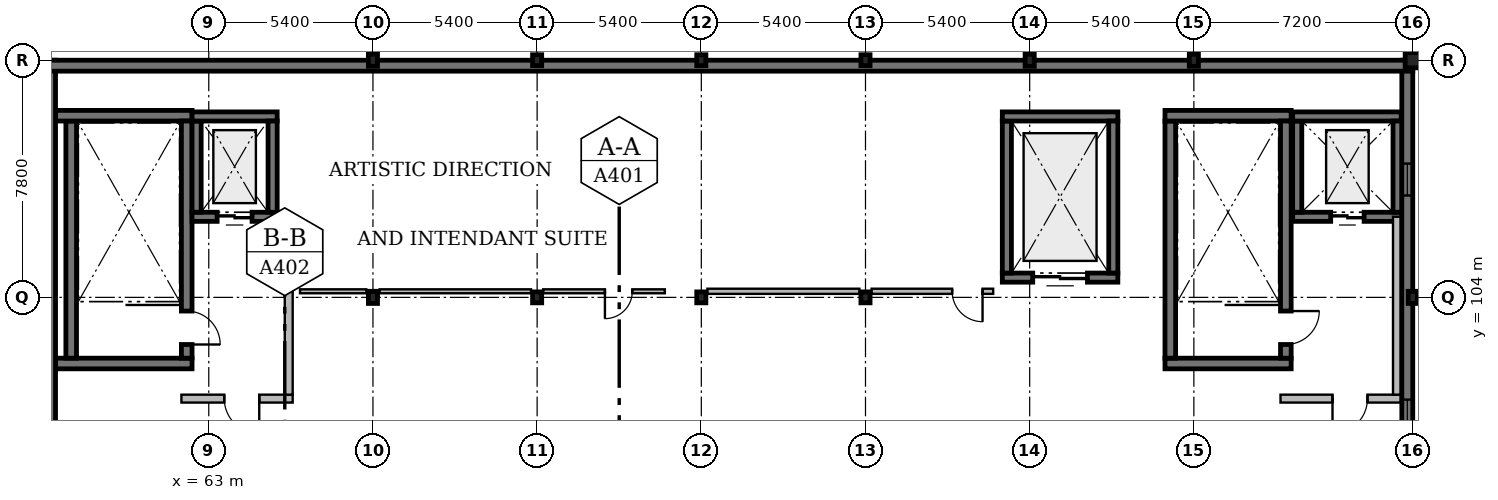
"""IFC4 building model, lengths in metres.
Left out: names, types, materials, properties, quantities, classifications, styles, units other than length and angle.
Written with IfcOpenShell. Run it as: python <this file> out.ifc"""

import sys

from ifc_helpers import new_model, si_unit, direction, frame, frame_2d, origin, origin_2d, place, context, subcontext, project, spatial, rectangle, i_section, extrude, element, fill, save


model = new_model("IFC4")
c1 = context("Model", 3, precision=1e-05, world=origin(), true_north=direction((0.0, 1.0)))
c2 = subcontext(c1, "Body", "Model", "MODEL_VIEW")
j1 = project(units=[si_unit("LENGTHUNIT", "METRE"), si_unit("PLANEANGLEUNIT", "RADIAN")], contexts=[c1])
p1 = place(None, origin())
s1 = spatial("IfcSite", under=j1, at=p1, CompositionType="ELEMENT")
p2 = place(p1, origin())
s2 = spatial("IfcBuilding", under=s1, at=p2, CompositionType="ELEMENT")
p3 = place(p2, frame((0.0, 0.0, 21.0)))
s3 = spatial("IfcBuildingStorey", under=s2, at=p3, CompositionType="ELEMENT", Elevation=21.0)
for number, where, z_axis, x_axis in (
    (1, (68.4, 104.0, 0.0), (0.0, 0.0, 1.0), (1.0, 0.0, 0.0)),
    (2, (68.4, 111.8, 0.0), (0.0, 0.0, 1.0), (1.0, 0.0, 0.0)),
):
    element("IfcColumn", number, at=place(p3, frame(where, z_axis=z_axis, x_axis=x_axis)), inside=s3, PredefinedType="COLUMN", context=c2, shape_type="SweptSolid", body=[
        extrude(i_section(OverallWidth=0.3, OverallDepth=0.4, WebThickness=0.013, FlangeThickness=0.024, FilletRadius=0.027, at=origin_2d()), origin(), (0.0, 0.0, 1.0), 3.9),
    ])
for number, where, z_axis, x_axis in (
    (3, (73.8, 104.0, 0.0), (0.0, 0.0, 1.0), (1.0, 0.0, 0.0)),
    (4, (73.8, 111.8, 0.0), (0.0, 0.0, 1.0), (1.0, 0.0, 0.0)),
    (5, (79.2, 104.0, 0.0), (0.0, 0.0, 1.0), (1.0, 0.0, 0.0)),
    (6, (79.2, 111.8, 0.0), (0.0, 0.0, 1.0), (1.0, 0.0, 0.0)),
    (7, (84.6, 104.0, 0.0), (0.0, 0.0, 1.0), (1.0, 0.0, 0.0)),
    (8, (84.6, 111.8, 0.0), (0.0, 0.0, 1.0), (1.0, 0.0, 0.0)),
):
    element("IfcColumn", number, at=place(p3, frame(where, z_axis=z_axis, x_axis=x_axis)), inside=s3, PredefinedType="COLUMN", context=c2, shape_type="SweptSolid", body=[
        extrude(i_section(OverallWidth=0.3, OverallDepth=0.36, WebThickness=0.012, FlangeThickness=0.022, FilletRadius=0.027, at=origin_2d()), origin(), (0.0, 0.0, 1.0), 3.9),
    ])
for number, where, z_axis, x_axis in (
    (9, (90.0, 111.8, 0.0), (0.0, 0.0, 1.0), (1.0, 0.0, 0.0)),
    (10, (95.4, 111.8, 0.0), (0.0, 0.0, 1.0), (1.0, 0.0, 0.0)),
    (11, (102.6, 104.0, 0.0), (0.0, 0.0, 1.0), (1.0, 0.0, 0.0)),
):
    element("IfcColumn", number, at=place(p3, frame(where, z_axis=z_axis, x_axis=x_axis)), inside=s3, PredefinedType="COLUMN", context=c2, shape_type="SweptSolid", body=[
        extrude(i_section(OverallWidth=0.3, OverallDepth=0.4, WebThickness=0.013, FlangeThickness=0.024, FilletRadius=0.027, at=origin_2d()), origin(), (0.0, 0.0, 1.0), 3.9),
    ])
p4 = place(p3, frame((102.6, 111.8, 0.0), z_axis=(0.0, 0.0, 1.0), x_axis=(1.0, 0.0, 0.0)))
e12 = element("IfcColumn", 12, at=p4, inside=s3, PredefinedType="COLUMN", context=c2, shape_type="SweptSolid", body=[
    extrude(rectangle(XDim=0.5, YDim=0.5, at=origin_2d()), origin(), (0.0, 0.0, 1.0), 3.9),
])
p5 = place(p3, frame((98.6, 101.825, 0.0), z_axis=(0.0, 0.0, 1.0), x_axis=(-1.0, 0.0, 0.0)))
e13 = element("IfcWall", 13, at=p5, inside=s3, PredefinedType="SOLIDWALL", context=c2, shape_type="SweptSolid", body=[
    extrude(rectangle(XDim=4.15, YDim=0.35, at=frame_2d((2.075, 0.0))), origin(), (0.0, 0.0, 1.0), 3.75),
])
p6 = place(p3, frame((94.625, 102.0, 0.0), z_axis=(0.0, 0.0, 1.0), x_axis=(0.0, 1.0, 0.0)))
e14 = element("IfcWall", 14, at=p6, inside=s3, PredefinedType="SOLIDWALL", context=c2, shape_type="SweptSolid", body=[
    extrude(rectangle(XDim=7.8, YDim=0.35, at=frame_2d((3.9, 0.0))), origin(), (0.0, 0.0, 1.0), 3.75),
])
p7 = place(p3, frame((94.45, 109.975, 0.0), z_axis=(0.0, 0.0, 1.0), x_axis=(1.0, 0.0, 0.0)))
e15 = element("IfcWall", 15, at=p7, inside=s3, PredefinedType="SOLIDWALL", context=c2, shape_type="SweptSolid", body=[
    extrude(rectangle(XDim=4.15, YDim=0.35, at=frame_2d((2.075, 0.0))), origin(), (0.0, 0.0, 1.0), 3.75),
])
p8 = place(p3, frame((98.425, 109.8, 0.0), z_axis=(0.0, 0.0, 1.0), x_axis=(0.0, -1.0, 0.0)))
e16 = element("IfcWall", 16, at=p8, inside=s3, PredefinedType="SOLIDWALL", context=c2, shape_type="SweptSolid", body=[
    extrude(rectangle(XDim=7.8, YDim=0.35, at=frame_2d((3.9, 0.0))), origin(), (0.0, 0.0, 1.0), 3.75),
])
p9 = place(p8, frame((6.25, 0.0, 0.0)))
e17 = element("IfcOpeningElement", 17, at=p9, cuts=e16, PredefinedType="OPENING", context=c2, shape_type="SweptSolid", body=[
    extrude(rectangle(XDim=1.1, YDim=2.15, at=frame_2d((0.55, 1.075))), frame((0.0, 0.195, 0.0), z_axis=(0.0, -1.0, 0.0), x_axis=(1.0, 0.0, 0.0)), (0.0, 0.0, 1.0), 0.39),
])
p10 = place(p3, frame((102.25, 106.65, 0.0), z_axis=(0.0, 0.0, 1.0), x_axis=(-1.0, 0.0, 0.0)))
e18 = element("IfcWall", 18, at=p10, inside=s3, PredefinedType="SOLIDWALL", context=c2, shape_type="SweptSolid", body=[
    extrude(rectangle(XDim=3.6, YDim=0.3, at=frame_2d((1.8, 0.0))), origin(), (0.0, 0.0, 1.0), 3.75),
])
p11 = place(p10, frame((1.25, 0.0, 0.0)))
e19 = element("IfcOpeningElement", 19, at=p11, cuts=e18, PredefinedType="OPENING", context=c2, shape_type="SweptSolid", body=[
    extrude(rectangle(XDim=1.1, YDim=2.1, at=frame_2d((0.55, 1.05))), frame((0.0, 0.17, 0.0), z_axis=(0.0, -1.0, 0.0), x_axis=(1.0, 0.0, 0.0)), (0.0, 0.0, 1.0), 0.34),
])
p12 = place(p3, frame((98.8, 106.8, 0.0), z_axis=(0.0, 0.0, 1.0), x_axis=(0.0, 1.0, 0.0)))
e20 = element("IfcWall", 20, at=p12, inside=s3, PredefinedType="SOLIDWALL", context=c2, shape_type="SweptSolid", body=[
    extrude(rectangle(XDim=3.0, YDim=0.3, at=frame_2d((1.5, 0.0))), origin(), (0.0, 0.0, 1.0), 3.75),
])
p13 = place(p3, frame((98.65, 109.95, 0.0), z_axis=(0.0, 0.0, 1.0), x_axis=(1.0, 0.0, 0.0)))
e21 = element("IfcWall", 21, at=p13, inside=s3, PredefinedType="SOLIDWALL", context=c2, shape_type="SweptSolid", body=[
    extrude(rectangle(XDim=3.57, YDim=0.3, at=frame_2d((1.785, 0.0))), origin(), (0.0, 0.0, 1.0), 3.75),
])
p14 = place(p3, frame((102.1, 109.8, 0.0), z_axis=(0.0, 0.0, 1.0), x_axis=(0.0, -1.0, 0.0)))
e22 = element("IfcWall", 22, at=p14, inside=s3, PredefinedType="SOLIDWALL", context=c2, shape_type="SweptSolid", body=[
    extrude(rectangle(XDim=3.0, YDim=0.3, at=frame_2d((1.5, 0.0))), origin(), (0.0, 0.0, 1.0), 3.75),
])
p15 = place(p3, frame((102.21, 100.67, 0.0), z_axis=(0.0, 0.0, 1.0), x_axis=(-1.0, 0.0, 0.0)))
e23 = element("IfcWall", 23, at=p15, inside=s3, PredefinedType="SOLIDWALL", context=c2, shape_type="SweptSolid", body=[
    extrude(rectangle(XDim=3.96, YDim=0.26, at=frame_2d((1.98, 0.0))), origin(), (0.0, 0.0, 1.0), 3.66),
])
p16 = place(p15, frame((1.1, 0.0, 0.0)))
e24 = element("IfcOpeningElement", 24, at=p16, cuts=e23, PredefinedType="OPENING", context=c2, shape_type="SweptSolid", body=[
    extrude(rectangle(XDim=1.15, YDim=2.2, at=frame_2d((0.575, 1.1))), frame((0.0, 0.15, 0.0), z_axis=(0.0, -1.0, 0.0), x_axis=(1.0, 0.0, 0.0)), (0.0, 0.0, 1.0), 0.3),
])
p17 = place(p3, frame((102.08, 106.65, 0.0), z_axis=(0.0, 0.0, 1.0), x_axis=(0.0, -1.0, 0.0)))
e25 = element("IfcWall", 25, at=p17, inside=s3, PredefinedType="SOLIDWALL", context=c2, shape_type="SweptSolid", body=[
    extrude(rectangle(XDim=5.85, YDim=0.26, at=frame_2d((2.925, 0.0))), origin(), (0.0, 0.0, 1.0), 3.66),
])
p18 = place(p3, frame((62.45, 101.825, 0.0), z_axis=(0.0, 0.0, 1.0), x_axis=(-1.0, 0.0, 0.0)))
e26 = element("IfcWall", 26, at=p18, inside=s3, PredefinedType="SOLIDWALL", context=c2, shape_type="SweptSolid", body=[
    extrude(rectangle(XDim=4.49, YDim=0.35, at=frame_2d((2.245, 0.0))), origin(), (0.0, 0.0, 1.0), 3.75),
])
p19 = place(p3, frame((58.475, 102.0, 0.0), z_axis=(0.0, 0.0, 1.0), x_axis=(0.0, 1.0, 0.0)))
e27 = element("IfcWall", 27, at=p19, inside=s3, PredefinedType="SOLIDWALL", context=c2, shape_type="SweptSolid", body=[
    extrude(rectangle(XDim=7.8, YDim=0.35, at=frame_2d((3.9, 0.0))), origin(), (0.0, 0.0, 1.0), 3.75),
])
p20 = place(p3, frame((57.96, 109.975, 0.0), z_axis=(0.0, 0.0, 1.0), x_axis=(1.0, 0.0, 0.0)))
e28 = element("IfcWall", 28, at=p20, inside=s3, PredefinedType="SOLIDWALL", context=c2, shape_type="SweptSolid", body=[
    extrude(rectangle(XDim=4.49, YDim=0.35, at=frame_2d((2.245, 0.0))), origin(), (0.0, 0.0, 1.0), 3.75),
])
p21 = place(p3, frame((62.275, 109.8, 0.0), z_axis=(0.0, 0.0, 1.0), x_axis=(0.0, -1.0, 0.0)))
e29 = element("IfcWall", 29, at=p21, inside=s3, PredefinedType="SOLIDWALL", context=c2, shape_type="SweptSolid", body=[
    extrude(rectangle(XDim=7.8, YDim=0.35, at=frame_2d((3.9, 0.0))), origin(), (0.0, 0.0, 1.0), 3.75),
])
p22 = place(p21, frame((6.25, 0.0, 0.0)))
e30 = element("IfcOpeningElement", 30, at=p22, cuts=e29, PredefinedType="OPENING", context=c2, shape_type="SweptSolid", body=[
    extrude(rectangle(XDim=1.1, YDim=2.15, at=frame_2d((0.55, 1.075))), frame((0.0, 0.195, 0.0), z_axis=(0.0, -1.0, 0.0), x_axis=(1.0, 0.0, 0.0)), (0.0, 0.0, 1.0), 0.39),
])
p23 = place(p3, frame((65.25, 106.65, 0.0), z_axis=(0.0, 0.0, 1.0), x_axis=(-1.0, 0.0, 0.0)))
e31 = element("IfcWall", 31, at=p23, inside=s3, PredefinedType="SOLIDWALL", context=c2, shape_type="SweptSolid", body=[
    extrude(rectangle(XDim=2.8, YDim=0.3, at=frame_2d((1.4, 0.0))), origin(), (0.0, 0.0, 1.0), 3.75),
])
p24 = place(p23, frame((0.825, 0.0, 0.0)))
e32 = element("IfcOpeningElement", 32, at=p24, cuts=e31, PredefinedType="OPENING", context=c2, shape_type="SweptSolid", body=[
    extrude(rectangle(XDim=1.15, YDim=2.1, at=frame_2d((0.575, 1.05))), frame((0.0, 0.17, 0.0), z_axis=(0.0, -1.0, 0.0), x_axis=(1.0, 0.0, 0.0)), (0.0, 0.0, 1.0), 0.34),
])
p25 = place(p3, frame((62.6, 106.8, 0.0), z_axis=(0.0, 0.0, 1.0), x_axis=(0.0, 1.0, 0.0)))
e33 = element("IfcWall", 33, at=p25, inside=s3, PredefinedType="SOLIDWALL", context=c2, shape_type="SweptSolid", body=[
    extrude(rectangle(XDim=3.0, YDim=0.3, at=frame_2d((1.5, 0.0))), origin(), (0.0, 0.0, 1.0), 3.75),
])
p26 = place(p3, frame((62.45, 109.95, 0.0), z_axis=(0.0, 0.0, 1.0), x_axis=(1.0, 0.0, 0.0)))
e34 = element("IfcWall", 34, at=p26, inside=s3, PredefinedType="SOLIDWALL", context=c2, shape_type="SweptSolid", body=[
    extrude(rectangle(XDim=2.8, YDim=0.3, at=frame_2d((1.4, 0.0))), origin(), (0.0, 0.0, 1.0), 3.75),
])
p27 = place(p3, frame((65.1, 109.8, 0.0), z_axis=(0.0, 0.0, 1.0), x_axis=(0.0, -1.0, 0.0)))
e35 = element("IfcWall", 35, at=p27, inside=s3, PredefinedType="SOLIDWALL", context=c2, shape_type="SweptSolid", body=[
    extrude(rectangle(XDim=3.0, YDim=0.3, at=frame_2d((1.5, 0.0))), origin(), (0.0, 0.0, 1.0), 3.75),
])
p28 = place(p3, frame((65.76, 100.67, 0.0), z_axis=(0.0, 0.0, 1.0), x_axis=(-1.0, 0.0, 0.0)))
e36 = element("IfcWall", 36, at=p28, inside=s3, PredefinedType="SOLIDWALL", context=c2, shape_type="SweptSolid", body=[
    extrude(rectangle(XDim=3.66, YDim=0.26, at=frame_2d((1.83, 0.0))), origin(), (0.0, 0.0, 1.0), 3.66),
])
p29 = place(p28, frame((1.1, 0.0, 0.0)))
e37 = element("IfcOpeningElement", 37, at=p29, cuts=e36, PredefinedType="OPENING", context=c2, shape_type="SweptSolid", body=[
    extrude(rectangle(XDim=1.15, YDim=2.2, at=frame_2d((0.575, 1.1))), frame((0.0, 0.15, 0.0), z_axis=(0.0, -1.0, 0.0), x_axis=(1.0, 0.0, 0.0)), (0.0, 0.0, 1.0), 0.3),
])
p30 = place(p3, frame((65.63, 106.65, 0.0), z_axis=(0.0, 0.0, 1.0), x_axis=(0.0, -1.0, 0.0)))
e38 = element("IfcWall", 38, at=p30, inside=s3, PredefinedType="SOLIDWALL", context=c2, shape_type="SweptSolid", body=[
    extrude(rectangle(XDim=5.85, YDim=0.26, at=frame_2d((2.925, 0.0))), origin(), (0.0, 0.0, 1.0), 3.66),
])
p31 = place(p3, frame((92.9, 104.65, 0.0), z_axis=(0.0, 0.0, 1.0), x_axis=(-1.0, 0.0, 0.0)))
e39 = element("IfcWall", 39, at=p31, inside=s3, PredefinedType="SOLIDWALL", context=c2, shape_type="SweptSolid", body=[
    extrude(rectangle(XDim=3.8, YDim=0.3, at=frame_2d((1.9, 0.0))), origin(), (0.0, 0.0, 1.0), 3.75),
])
p32 = place(p31, frame((1.0, 0.0, 0.0)))
e40 = element("IfcOpeningElement", 40, at=p32, cuts=e39, PredefinedType="OPENING", context=c2, shape_type="SweptSolid", body=[
    extrude(rectangle(XDim=1.8, YDim=2.4, at=frame_2d((0.9, 1.2))), frame((0.0, 0.17, 0.0), z_axis=(0.0, -1.0, 0.0), x_axis=(1.0, 0.0, 0.0)), (0.0, 0.0, 1.0), 0.34),
])
p33 = place(p3, frame((89.25, 104.8, 0.0), z_axis=(0.0, 0.0, 1.0), x_axis=(0.0, 1.0, 0.0)))
e41 = element("IfcWall", 41, at=p33, inside=s3, PredefinedType="SOLIDWALL", context=c2, shape_type="SweptSolid", body=[
    extrude(rectangle(XDim=5.0, YDim=0.3, at=frame_2d((2.5, 0.0))), origin(), (0.0, 0.0, 1.0), 3.75),
])
p34 = place(p3, frame((89.1, 109.95, 0.0), z_axis=(0.0, 0.0, 1.0), x_axis=(1.0, 0.0, 0.0)))
e42 = element("IfcWall", 42, at=p34, inside=s3, PredefinedType="SOLIDWALL", context=c2, shape_type="SweptSolid", body=[
    extrude(rectangle(XDim=3.8, YDim=0.3, at=frame_2d((1.9, 0.0))), origin(), (0.0, 0.0, 1.0), 3.75),
])
p35 = place(p3, frame((92.75, 109.8, 0.0), z_axis=(0.0, 0.0, 1.0), x_axis=(0.0, -1.0, 0.0)))
e43 = element("IfcWall", 43, at=p35, inside=s3, PredefinedType="SOLIDWALL", context=c2, shape_type="SweptSolid", body=[
    extrude(rectangle(XDim=5.0, YDim=0.3, at=frame_2d((2.5, 0.0))), origin(), (0.0, 0.0, 1.0), 3.75),
])
p36 = place(p3, frame((57.78, 87.8, 0.0), z_axis=(0.0, 0.0, 1.0), x_axis=(0.0, 1.0, 0.0)))
e44 = element("IfcWall", 44, at=p36, inside=s3, PredefinedType="SOLIDWALL", context=c2, shape_type="SweptSolid", body=[
    extrude(rectangle(XDim=24.0, YDim=0.36, at=frame_2d((12.0, 0.0))), origin(), (0.0, 0.0, 1.0), 3.65),
])
p37 = place(p3, frame((102.42, 87.8, 0.0), z_axis=(0.0, 0.0, 1.0), x_axis=(0.0, 1.0, 0.0)))
e45 = element("IfcWall", 45, at=p37, inside=s3, PredefinedType="SOLIDWALL", context=c2, shape_type="SweptSolid", body=[
    extrude(rectangle(XDim=24.0, YDim=0.36, at=frame_2d((12.0, 0.0))), origin(), (0.0, 0.0, 1.0), 3.65),
])
p38 = place(p37, frame((3.63, 0.0, 0.95)))
e46 = element("IfcOpeningElement", 46, at=p38, cuts=e45, PredefinedType="OPENING", context=c2, shape_type="SweptSolid", body=[
    extrude(rectangle(XDim=1.14, YDim=1.85, at=frame_2d((0.57, 0.925))), frame((0.0, 0.2, 0.0), z_axis=(0.0, -1.0, 0.0), x_axis=(1.0, 0.0, 0.0)), (0.0, 0.0, 1.0), 0.4),
])
p39 = place(p37, frame((11.788, 0.0, 0.95)))
e47 = element("IfcOpeningElement", 47, at=p39, cuts=e45, PredefinedType="OPENING", context=c2, shape_type="SweptSolid", body=[
    extrude(rectangle(XDim=1.05, YDim=1.85, at=frame_2d((0.525, 0.925))), frame((0.0, 0.2, 0.0), z_axis=(0.0, -1.0, 0.0), x_axis=(1.0, 0.0, 0.0)), (0.0, 0.0, 1.0), 0.4),
])
p40 = place(p37, frame((19.55, 0.0, 0.95)))
e48 = element("IfcOpeningElement", 48, at=p40, cuts=e45, PredefinedType="OPENING", context=c2, shape_type="SweptSolid", body=[
    extrude(rectangle(XDim=1.05, YDim=1.6, at=frame_2d((0.525, 0.8))), frame((0.0, 0.2, 0.0), z_axis=(0.0, -1.0, 0.0), x_axis=(1.0, 0.0, 0.0)), (0.0, 0.0, 1.0), 0.4),
])
p41 = place(p3, frame((57.6, 111.62, 0.0), z_axis=(0.0, 0.0, 1.0), x_axis=(1.0, 0.0, 0.0)))
e49 = element("IfcWall", 49, at=p41, inside=s3, PredefinedType="SOLIDWALL", context=c2, shape_type="SweptSolid", body=[
    extrude(rectangle(XDim=45.0, YDim=0.36, at=frame_2d((22.5, 0.0))), origin(), (0.0, 0.0, 1.0), 3.65),
])
p42 = place(p3, frame((78.0, 104.2, 0.0), z_axis=(0.0, 0.0, 1.0), x_axis=(-1.0, 0.0, 0.0)))
e50 = element("IfcWall", 50, at=p42, inside=s3, PredefinedType="PARTITIONING", context=c2, shape_type="SweptSolid", body=[
    extrude(rectangle(XDim=4.0, YDim=0.13, at=frame_2d((2.0, 0.0))), origin(), (0.0, 0.0, 1.0), 3.18),
])
p43 = place(p42, frame((1.07, 0.0, 0.0)))
e51 = element("IfcOpeningElement", 51, at=p43, cuts=e50, PredefinedType="OPENING", context=c2, shape_type="SweptSolid", body=[
    extrude(rectangle(XDim=0.9, YDim=2.15, at=frame_2d((0.45, 1.075))), frame((0.0, 0.085, 0.0), z_axis=(0.0, -1.0, 0.0), x_axis=(1.0, 0.0, 0.0)), (0.0, 0.0, 1.0), 0.17),
])
p44 = place(p3, frame((73.6, 104.2, 0.0), z_axis=(0.0, 0.0, 1.0), x_axis=(-1.0, 0.0, 0.0)))
e52 = element("IfcWall", 52, at=p44, inside=s3, PredefinedType="PARTITIONING", context=c2, shape_type="SweptSolid", body=[
    extrude(rectangle(XDim=4.98, YDim=0.13, at=frame_2d((2.49, 0.0))), origin(), (0.0, 0.0, 1.0), 3.18),
])
p45 = place(p3, frame((68.18, 104.2, 0.0), z_axis=(0.0, 0.0, 1.0), x_axis=(-1.0, 0.0, 0.0)))
e53 = element("IfcWall", 53, at=p45, inside=s3, PredefinedType="PARTITIONING", context=c2, shape_type="SweptSolid", body=[
    extrude(rectangle(XDim=2.18, YDim=0.13, at=frame_2d((1.09, 0.0))), origin(), (0.0, 0.0, 1.0), 3.66),
])
p46 = place(p3, frame((88.8, 104.2, 0.0), z_axis=(0.0, 0.0, 1.0), x_axis=(-1.0, 0.0, 0.0)))
e54 = element("IfcWall", 54, at=p46, inside=s3, PredefinedType="PARTITIONING", context=c2, shape_type="SweptSolid", body=[
    extrude(rectangle(XDim=4.0, YDim=0.17, at=frame_2d((2.0, 0.0))), origin(), (0.0, 0.0, 1.0), 3.66),
])
p47 = place(p46, frame((0.35, 0.0, 0.0)))
e55 = element("IfcOpeningElement", 55, at=p47, cuts=e54, PredefinedType="OPENING", context=c2, shape_type="SweptSolid", body=[
    extrude(rectangle(XDim=1.0, YDim=2.2, at=frame_2d((0.5, 1.1))), frame((0.0, 0.105, 0.0), z_axis=(0.0, -1.0, 0.0), x_axis=(1.0, 0.0, 0.0)), (0.0, 0.0, 1.0), 0.21),
])
p48 = place(p3, frame((84.4, 104.2, 0.0), z_axis=(0.0, 0.0, 1.0), x_axis=(-1.0, 0.0, 0.0)))
e56 = element("IfcWall", 56, at=p48, inside=s3, PredefinedType="PARTITIONING", context=c2, shape_type="SweptSolid", body=[
    extrude(rectangle(XDim=5.0, YDim=0.17, at=frame_2d((2.5, 0.0))), origin(), (0.0, 0.0, 1.0), 3.18),
])
p49 = place(p9, origin())
e57 = element("IfcDoor", 57, at=p49, inside=s3, OperationType="SINGLE_SWING_LEFT", PredefinedType="DOOR", context=c2, shape_type="SweptSolid", body=[
    extrude(rectangle(XDim=1.1, YDim=2.15, at=frame_2d((0.55, 1.075))), frame((0.0, 0.025, 0.0), z_axis=(0.0, -1.0, 0.0), x_axis=(1.0, 0.0, 0.0)), (0.0, 0.0, 1.0), 0.05),
])
fill(e17, e57)
p50 = place(p11, origin())
e58 = element("IfcDoor", 58, at=p50, inside=s3, OperationType="DOUBLE_DOOR_SLIDING", PredefinedType="DOOR", context=c2, shape_type="SweptSolid", body=[
    extrude(rectangle(XDim=1.1, YDim=2.1, at=frame_2d((0.55, 1.05))), frame((0.0, 0.025, 0.0), z_axis=(0.0, -1.0, 0.0), x_axis=(1.0, 0.0, 0.0)), (0.0, 0.0, 1.0), 0.05),
])
fill(e19, e58)
p51 = place(p16, origin())
e59 = element("IfcDoor", 59, at=p51, inside=s3, OperationType="SINGLE_SWING_RIGHT", PredefinedType="DOOR", context=c2, shape_type="SweptSolid", body=[
    extrude(rectangle(XDim=1.15, YDim=2.2, at=frame_2d((0.575, 1.1))), frame((0.0, 0.025, 0.0), z_axis=(0.0, -1.0, 0.0), x_axis=(1.0, 0.0, 0.0)), (0.0, 0.0, 1.0), 0.05),
])
fill(e24, e59)
p52 = place(p22, origin())
e60 = element("IfcDoor", 60, at=p52, inside=s3, OperationType="SINGLE_SWING_RIGHT", PredefinedType="DOOR", context=c2, shape_type="SweptSolid", body=[
    extrude(rectangle(XDim=1.1, YDim=2.15, at=frame_2d((0.55, 1.075))), frame((0.0, 0.025, 0.0), z_axis=(0.0, -1.0, 0.0), x_axis=(1.0, 0.0, 0.0)), (0.0, 0.0, 1.0), 0.05),
])
fill(e30, e60)
p53 = place(p24, origin())
e61 = element("IfcDoor", 61, at=p53, inside=s3, OperationType="DOUBLE_DOOR_SLIDING", PredefinedType="DOOR", context=c2, shape_type="SweptSolid", body=[
    extrude(rectangle(XDim=1.15, YDim=2.1, at=frame_2d((0.575, 1.05))), frame((0.0, 0.025, 0.0), z_axis=(0.0, -1.0, 0.0), x_axis=(1.0, 0.0, 0.0)), (0.0, 0.0, 1.0), 0.05),
])
fill(e32, e61)
p54 = place(p29, origin())
e62 = element("IfcDoor", 62, at=p54, inside=s3, OperationType="SINGLE_SWING_LEFT", PredefinedType="DOOR", context=c2, shape_type="SweptSolid", body=[
    extrude(rectangle(XDim=1.15, YDim=2.2, at=frame_2d((0.575, 1.1))), frame((0.0, 0.025, 0.0), z_axis=(0.0, -1.0, 0.0), x_axis=(1.0, 0.0, 0.0)), (0.0, 0.0, 1.0), 0.05),
])
fill(e37, e62)
p55 = place(p32, origin())
e63 = element("IfcDoor", 63, at=p55, inside=s3, OperationType="DOUBLE_DOOR_SLIDING", PredefinedType="DOOR", context=c2, shape_type="SweptSolid", body=[
    extrude(rectangle(XDim=1.8, YDim=2.4, at=frame_2d((0.9, 1.2))), frame((0.0, 0.025, 0.0), z_axis=(0.0, -1.0, 0.0), x_axis=(1.0, 0.0, 0.0)), (0.0, 0.0, 1.0), 0.05),
])
fill(e40, e63)
p56 = place(p39, origin())
e64 = element("IfcWindow", 64, at=p56, inside=s3, PartitioningType="SINGLE_PANEL", PredefinedType="WINDOW", context=c2, shape_type="SweptSolid", body=[
    extrude(rectangle(XDim=1.05, YDim=1.85, at=frame_2d((0.525, 0.925))), frame((0.0, 0.03, 0.0), z_axis=(0.0, -1.0, 0.0), x_axis=(1.0, 0.0, 0.0)), (0.0, 0.0, 1.0), 0.06),
])
fill(e47, e64)
p57 = place(p40, origin())
e65 = element("IfcWindow", 65, at=p57, inside=s3, PartitioningType="SINGLE_PANEL", PredefinedType="WINDOW", context=c2, shape_type="SweptSolid", body=[
    extrude(rectangle(XDim=1.05, YDim=1.6, at=frame_2d((0.525, 0.8))), frame((0.0, 0.03, 0.0), z_axis=(0.0, -1.0, 0.0), x_axis=(1.0, 0.0, 0.0)), (0.0, 0.0, 1.0), 0.06),
])
fill(e48, e65)
p58 = place(p43, origin())
e66 = element("IfcDoor", 66, at=p58, inside=s3, OperationType="SINGLE_SWING_RIGHT", PredefinedType="DOOR", context=c2, shape_type="SweptSolid", body=[
    extrude(rectangle(XDim=0.9, YDim=2.15, at=frame_2d((0.45, 1.075))), frame((0.0, 0.025, 0.0), z_axis=(0.0, -1.0, 0.0), x_axis=(1.0, 0.0, 0.0)), (0.0, 0.0, 1.0), 0.05),
])
fill(e51, e66)
p59 = place(p47, origin())
e67 = element("IfcDoor", 67, at=p59, inside=s3, OperationType="SINGLE_SWING_LEFT", PredefinedType="DOOR", context=c2, shape_type="SweptSolid", body=[
    extrude(rectangle(XDim=1.0, YDim=2.2, at=frame_2d((0.5, 1.1))), frame((0.0, 0.025, 0.0), z_axis=(0.0, -1.0, 0.0), x_axis=(1.0, 0.0, 0.0)), (0.0, 0.0, 1.0), 0.05),
])
fill(e55, e67)
save(model, sys.argv[1])
